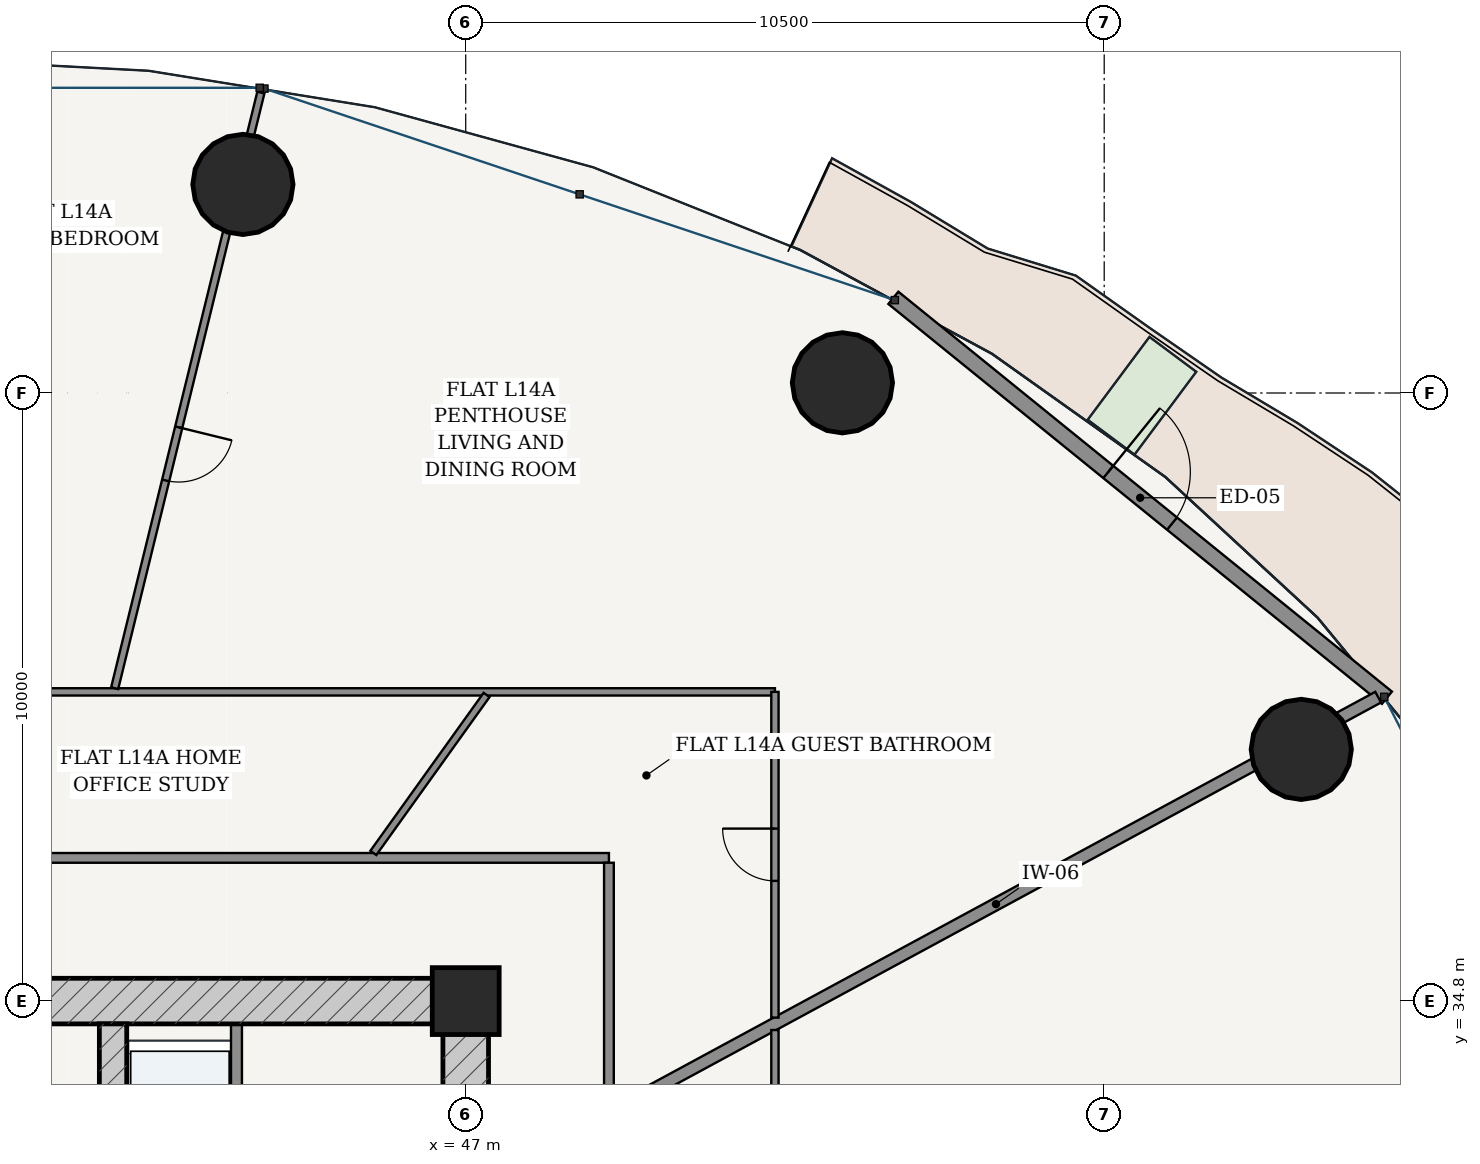
"""IFC4 building model, lengths in metres.
Left out: names, types, materials, properties, quantities, classifications, styles, units other than length and angle.
Written with IfcOpenShell. Run it as: python <this file> out.ifc"""

import sys

from ifc_helpers import new_model, si_unit, direction, frame, frame_2d, origin, origin_2d, place, context, subcontext, project, spatial, rectangle, hollow_circle, extrude, source, transform, mapped, element, fill, save


model = new_model("IFC4")
c1 = context("Model", 3, precision=1e-05, world=origin(), true_north=direction((-0.2419218956, 0.970295726276)))
c2 = subcontext(c1, "Body", "Model", "MODEL_VIEW")
j1 = project(units=[si_unit("LENGTHUNIT", "METRE"), si_unit("PLANEANGLEUNIT", "RADIAN")], contexts=[c1])
p1 = place(None, origin())
s1 = spatial("IfcSite", under=j1, at=p1, CompositionType="ELEMENT")
p2 = place(p1, origin())
s2 = spatial("IfcBuilding", under=s1, at=p2, CompositionType="ELEMENT")
p3 = place(p2, frame((0.0, 0.0, 56.4)))
s3 = spatial("IfcBuildingStorey", under=s2, at=p3, CompositionType="ELEMENT", Elevation=56.4)
p4 = place(p3, frame((47.0, 34.8, 0.0), z_axis=(0.0, 0.0, 1.0), x_axis=(1.0, 0.0, 0.0)))
e1 = element("IfcColumn", 1, at=p4, inside=s3, PredefinedType="COLUMN", context=c2, shape_type="SweptSolid", body=[
    extrude(rectangle(XDim=1.1, YDim=1.1, at=origin_2d()), origin(), (0.0, 0.0, 1.0), 3.6),
])
p5 = place(p3, frame((28.625, 34.8, 0.0), z_axis=(0.0, 0.0, 1.0), x_axis=(1.0, 0.0, 0.0)))
e2 = element("IfcWall", 2, at=p5, inside=s3, PredefinedType="SHEAR", context=c2, shape_type="SweptSolid", body=[
    extrude(rectangle(XDim=18.75, YDim=0.75, at=frame_2d((9.375, 0.0))), origin(), (0.0, 0.0, 1.0), 3.32),
])
p6 = place(p5, frame((8.95, 0.0, 0.0)))
e3 = element("IfcOpeningElement", 3, at=p6, cuts=e2, PredefinedType="OPENING", context=c2, shape_type="SweptSolid", body=[
    extrude(rectangle(XDim=0.85, YDim=2.1, at=frame_2d((0.425, 1.05))), frame((0.0, 0.385, 0.0), z_axis=(0.0, -1.0, 0.0), x_axis=(1.0, 0.0, 0.0)), (0.0, 0.0, 1.0), 0.77),
])
p7 = place(p3, frame((47.0, 19.175, 0.0), z_axis=(0.0, 0.0, 1.0), x_axis=(0.0, 1.0, 0.0)))
e4 = element("IfcWall", 4, at=p7, inside=s3, PredefinedType="SHEAR", context=c2, shape_type="SweptSolid", body=[
    extrude(rectangle(XDim=15.25, YDim=0.75, at=frame_2d((7.625, 0.0))), origin(), (0.0, 0.0, 1.0), 3.32),
])
p8 = place(p7, frame((9.875, 0.0, 0.0)))
e5 = element("IfcOpeningElement", 5, at=p8, cuts=e4, PredefinedType="OPENING", context=c2, shape_type="SweptSolid", body=[
    extrude(rectangle(XDim=1.5, YDim=2.2, at=frame_2d((0.75, 1.1))), frame((0.0, 0.385, 0.0), z_axis=(0.0, -1.0, 0.0), x_axis=(1.0, 0.0, 0.0)), (0.0, 0.0, 1.0), 0.77),
])
p9 = place(p3, frame((41.2, 19.175, 0.0), z_axis=(0.0, 0.0, 1.0), x_axis=(0.0, 1.0, 0.0)))
e6 = element("IfcWall", 6, at=p9, inside=s3, PredefinedType="SHEAR", context=c2, shape_type="SweptSolid", body=[
    extrude(rectangle(XDim=15.25, YDim=0.45, at=frame_2d((7.625, 0.0))), origin(), (0.0, 0.0, 1.0), 3.32),
])
p10 = place(p9, frame((7.8, 0.0, 0.0)))
e7 = element("IfcOpeningElement", 7, at=p10, cuts=e6, PredefinedType="OPENING", context=c2, shape_type="SweptSolid", body=[
    extrude(rectangle(XDim=1.05, YDim=2.15, at=frame_2d((0.525, 1.075))), frame((0.0, 0.235, 0.0), z_axis=(0.0, -1.0, 0.0), x_axis=(1.0, 0.0, 0.0)), (0.0, 0.0, 1.0), 0.47),
])
for number, where, z_axis, x_axis in (
    (8, (60.741, 38.939, 0.0), (0.0, 0.0, 1.0), (1.0, 0.0, 0.0)),
    (9, (53.195, 44.968, 0.0), (0.0, 0.0, 1.0), (1.0, 0.0, 0.0)),
    (10, (43.336, 48.23, 0.0), (0.0, 0.0, 1.0), (1.0, 0.0, 0.0)),
):
    element("IfcColumn", number, at=place(p3, frame(where, z_axis=z_axis, x_axis=x_axis)), inside=s3, PredefinedType="COLUMN", context=c2, shape_type="SweptSolid", body=[
        extrude(hollow_circle(Radius=0.825, WallThickness=0.05, at=origin_2d()), origin(), (0.0, 0.0, 1.0), 3.6),
    ])
p11 = place(p3, frame((62.15, 39.789, 0.0), z_axis=(0.0, 0.0, 1.0), x_axis=(-0.777005352078, 0.62949398952, 0.0)))
e11 = element("IfcWall", 11, at=p11, inside=s3, PredefinedType="SOLIDWALL", context=c2, shape_type="SweptSolid", body=[
    extrude(rectangle(XDim=10.447, YDim=0.26, at=frame_2d((5.223, 0.0))), origin(), (0.0, 0.0, 1.0), 3.32),
])
p12 = place(p11, frame((4.548, 0.0, 0.0)))
e12 = element("IfcOpeningElement", 12, at=p12, cuts=e11, PredefinedType="OPENING", context=c2, shape_type="SweptSolid", body=[
    extrude(rectangle(XDim=1.35, YDim=2.2, at=frame_2d((0.675, 1.1))), frame((0.0, 0.14, 0.0), z_axis=(0.0, -1.0, 0.0), x_axis=(1.0, 0.0, 0.0)), (0.0, 0.0, 1.0), 0.28),
])
p13 = place(p3, frame((43.23, 28.52, 0.0), z_axis=(0.0, 0.0, 1.0), x_axis=(0.0, 1.0, 0.0)))
e13 = element("IfcWall", 13, at=p13, inside=s3, PredefinedType="PARTITIONING", context=c2, shape_type="SweptSolid", body=[
    extrude(rectangle(XDim=5.905, YDim=0.18, at=frame_2d((2.953, 0.0))), origin(), (0.0, 0.0, 1.0), 3.32),
])
p14 = place(p13, frame((0.905, 0.0, 0.0)))
e14 = element("IfcOpeningElement", 14, at=p14, cuts=e13, PredefinedType="OPENING", context=c2, shape_type="SweptSolid", body=[
    extrude(rectangle(XDim=0.85, YDim=2.1, at=frame_2d((0.425, 1.05))), frame((0.0, 0.1, 0.0), z_axis=(0.0, -1.0, 0.0), x_axis=(1.0, 0.0, 0.0)), (0.0, 0.0, 1.0), 0.2),
])
p15 = place(p13, frame((3.655, 0.0, 0.0)))
e15 = element("IfcOpeningElement", 15, at=p15, cuts=e13, PredefinedType="OPENING", context=c2, shape_type="SweptSolid", body=[
    extrude(rectangle(XDim=1.15, YDim=2.2, at=frame_2d((0.575, 1.1))), frame((0.0, 0.1, 0.0), z_axis=(0.0, -1.0, 0.0), x_axis=(1.0, 0.0, 0.0)), (0.0, 0.0, 1.0), 0.2),
])
p16 = place(p3, frame((26.645, 37.155, 0.0), z_axis=(0.0, 0.0, 1.0), x_axis=(1.0, 0.0, 0.0)))
e16 = element("IfcWall", 16, at=p16, inside=s3, PredefinedType="PARTITIONING", context=c2, shape_type="SweptSolid", body=[
    extrude(rectangle(XDim=22.71, YDim=0.16, at=frame_2d((11.355, 0.0))), origin(), (0.0, 0.0, 1.0), 2.688),
])
p17 = place(p3, frame((49.355, 16.525, 0.0), z_axis=(0.0, 0.0, 1.0), x_axis=(0.0, 1.0, 0.0)))
e17 = element("IfcWall", 17, at=p17, inside=s3, PredefinedType="PARTITIONING", context=c2, shape_type="SweptSolid", body=[
    extrude(rectangle(XDim=20.55, YDim=0.16, at=frame_2d((10.275, 0.0))), origin(), (0.0, 0.0, 1.0), 2.688),
])
p18 = place(p17, frame((2.733, 0.0, 0.0)))
e18 = element("IfcOpeningElement", 18, at=p18, cuts=e17, PredefinedType="OPENING", context=c2, shape_type="SweptSolid", body=[
    extrude(rectangle(XDim=0.98, YDim=2.2, at=frame_2d((0.49, 1.1))), frame((0.0, 0.09, 0.0), z_axis=(0.0, -1.0, 0.0), x_axis=(1.0, 0.0, 0.0)), (0.0, 0.0, 1.0), 0.18),
])
p19 = place(p3, frame((49.435, 32.991, 0.0), z_axis=(0.0, 0.0, 1.0), x_axis=(0.879369737803, 0.476139542819, 0.0)))
e19 = element("IfcWall", 19, at=p19, inside=s3, PredefinedType="PARTITIONING", context=c2, shape_type="SweptSolid", body=[
    extrude(rectangle(XDim=14.295, YDim=0.2, at=frame_2d((7.147, 0.0))), origin(), (0.0, 0.0, 1.0), 2.688),
])
p20 = place(p3, frame((23.915, 39.885, 0.0), z_axis=(0.0, 0.0, 1.0), x_axis=(1.0, 0.0, 0.0)))
e20 = element("IfcWall", 20, at=p20, inside=s3, PredefinedType="PARTITIONING", context=c2, shape_type="SweptSolid", body=[
    extrude(rectangle(XDim=28.17, YDim=0.12, at=frame_2d((14.085, 0.0))), origin(), (0.0, 0.0, 1.0), 2.688),
])
p21 = place(p20, frame((12.891, 0.0, 0.0)))
e21 = element("IfcOpeningElement", 21, at=p21, cuts=e20, PredefinedType="OPENING", context=c2, shape_type="SweptSolid", body=[
    extrude(rectangle(XDim=0.9, YDim=2.15, at=frame_2d((0.45, 1.075))), frame((0.0, 0.07, 0.0), z_axis=(0.0, -1.0, 0.0), x_axis=(1.0, 0.0, 0.0)), (0.0, 0.0, 1.0), 0.14),
])
p22 = place(p3, frame((52.085, 39.885, 0.0), z_axis=(0.0, 0.0, 1.0), x_axis=(0.0, -1.0, 0.0)))
e22 = element("IfcWall", 22, at=p22, inside=s3, PredefinedType="PARTITIONING", context=c2, shape_type="SweptSolid", body=[
    extrude(rectangle(XDim=5.357, YDim=0.12, at=frame_2d((2.678, 0.0))), origin(), (0.0, 0.0, 1.0), 2.999),
])
p23 = place(p22, frame((2.248, 0.0, 0.0)))
e23 = element("IfcOpeningElement", 23, at=p23, cuts=e22, PredefinedType="OPENING", context=c2, shape_type="SweptSolid", body=[
    extrude(rectangle(XDim=0.86, YDim=2.15, at=frame_2d((0.43, 1.075))), frame((0.0, 0.07, 0.0), z_axis=(0.0, -1.0, 0.0), x_axis=(1.0, 0.0, 0.0)), (0.0, 0.0, 1.0), 0.14),
])
p24 = place(p3, frame((41.227, 39.945, 0.0), z_axis=(0.0, 0.0, 1.0), x_axis=(0.238375747469, 0.97117300365, 0.0)))
e24 = element("IfcWall", 24, at=p24, inside=s3, PredefinedType="PARTITIONING", context=c2, shape_type="SweptSolid", body=[
    extrude(rectangle(XDim=10.086, YDim=0.12, at=frame_2d((5.043, 0.0))), origin(), (0.0, 0.0, 1.0), 2.688),
])
p25 = place(p24, frame((3.518, 0.0, 0.0)))
e25 = element("IfcOpeningElement", 25, at=p25, cuts=e24, PredefinedType="OPENING", context=c2, shape_type="SweptSolid", body=[
    extrude(rectangle(XDim=0.9, YDim=2.15, at=frame_2d((0.45, 1.075))), frame((0.0, 0.07, 0.0), z_axis=(0.0, -1.0, 0.0), x_axis=(1.0, 0.0, 0.0)), (0.0, 0.0, 1.0), 0.14),
])
p26 = place(p3, frame((45.481, 37.237, 0.0), z_axis=(0.0, 0.0, 1.0), x_axis=(0.582530715463, 0.812808689387, 0.0)))
e26 = element("IfcWall", 26, at=p26, inside=s3, PredefinedType="PARTITIONING", context=c2, shape_type="SweptSolid", body=[
    extrude(rectangle(XDim=3.197, YDim=0.12, at=frame_2d((1.598, 0.0))), origin(), (0.0, 0.0, 1.0), 3.32),
])
p27 = place(p3, frame((52.085, 34.324, 0.0), z_axis=(0.0, 0.0, 1.0), x_axis=(0.0, -1.0, 0.0)))
e27 = element("IfcWall", 27, at=p27, inside=s3, PredefinedType="PARTITIONING", context=c2, shape_type="SweptSolid", body=[
    extrude(rectangle(XDim=20.609, YDim=0.12, at=frame_2d((10.305, 0.0))), origin(), (0.0, 0.0, 1.0), 2.688),
])
p28 = place(p27, frame((15.972, 0.0, 0.0)))
e28 = element("IfcOpeningElement", 28, at=p28, cuts=e27, PredefinedType="OPENING", context=c2, shape_type="SweptSolid", body=[
    extrude(rectangle(XDim=0.9, YDim=2.15, at=frame_2d((0.45, 1.075))), frame((0.0, 0.07, 0.0), z_axis=(0.0, -1.0, 0.0), x_axis=(1.0, 0.0, 0.0)), (0.0, 0.0, 1.0), 0.14),
])
p29 = place(p27, frame((3.058, 0.0, 0.0)))
e29 = element("IfcOpeningElement", 29, at=p29, cuts=e27, PredefinedType="OPENING", context=c2, shape_type="SweptSolid", body=[
    extrude(rectangle(XDim=0.9, YDim=2.15, at=frame_2d((0.45, 1.075))), frame((0.0, 0.07, 0.0), z_axis=(0.0, -1.0, 0.0), x_axis=(1.0, 0.0, 0.0)), (0.0, 0.0, 1.0), 0.14),
])
m1 = source(origin(), c2, "Body", "SweptSolid", [
    extrude(rectangle(XDim=1.35, YDim=2.2, at=frame_2d((0.675, 1.1))), frame((0.0, 0.025, 0.0), z_axis=(0.0, -1.0, 0.0), x_axis=(1.0, 0.0, 0.0)), (0.0, 0.0, 1.0), 0.05),
])
p30 = place(p12, frame((1.35, 0.0, 0.0), z_axis=(0.0, 0.0, 1.0), x_axis=(-1.0, 0.0, 0.0)))
e30 = element("IfcDoor", 30, at=p30, inside=s3, OperationType="SINGLE_SWING_LEFT", PredefinedType="DOOR", context=c2, shape_type="MappedRepresentation", body=[
    mapped(m1, transform((0.0, 0.0, 0.0), scale=1.0)),
])
fill(e12, e30)
m2 = source(origin(), c2, "Body", "SweptSolid", [
    extrude(rectangle(XDim=0.9, YDim=2.15, at=frame_2d((0.45, 1.075))), frame((0.0, 0.025, 0.0), z_axis=(0.0, -1.0, 0.0), x_axis=(1.0, 0.0, 0.0)), (0.0, 0.0, 1.0), 0.05),
])
p31 = place(p25, frame((0.9, 0.0, 0.0), z_axis=(0.0, 0.0, 1.0), x_axis=(-1.0, 0.0, 0.0)))
e31 = element("IfcDoor", 31, at=p31, inside=s3, OperationType="SINGLE_SWING_LEFT", PredefinedType="DOOR", context=c2, shape_type="MappedRepresentation", body=[
    mapped(m2, transform((0.0, 0.0, 0.0), scale=1.0)),
])
fill(e25, e31)
m3 = source(origin(), c2, "Body", "SweptSolid", [
    extrude(rectangle(XDim=0.86, YDim=2.15, at=frame_2d((0.43, 1.075))), frame((0.0, 0.025, 0.0), z_axis=(0.0, -1.0, 0.0), x_axis=(1.0, 0.0, 0.0)), (0.0, 0.0, 1.0), 0.05),
])
p32 = place(p23, frame((0.86, 0.0, 0.0), z_axis=(0.0, 0.0, 1.0), x_axis=(-1.0, 0.0, 0.0)))
e32 = element("IfcDoor", 32, at=p32, inside=s3, OperationType="SINGLE_SWING_RIGHT", PredefinedType="DOOR", context=c2, shape_type="MappedRepresentation", body=[
    mapped(m3, transform((0.0, 0.0, 0.0), scale=1.0)),
])
fill(e23, e32)
save(model, sys.argv[1])
